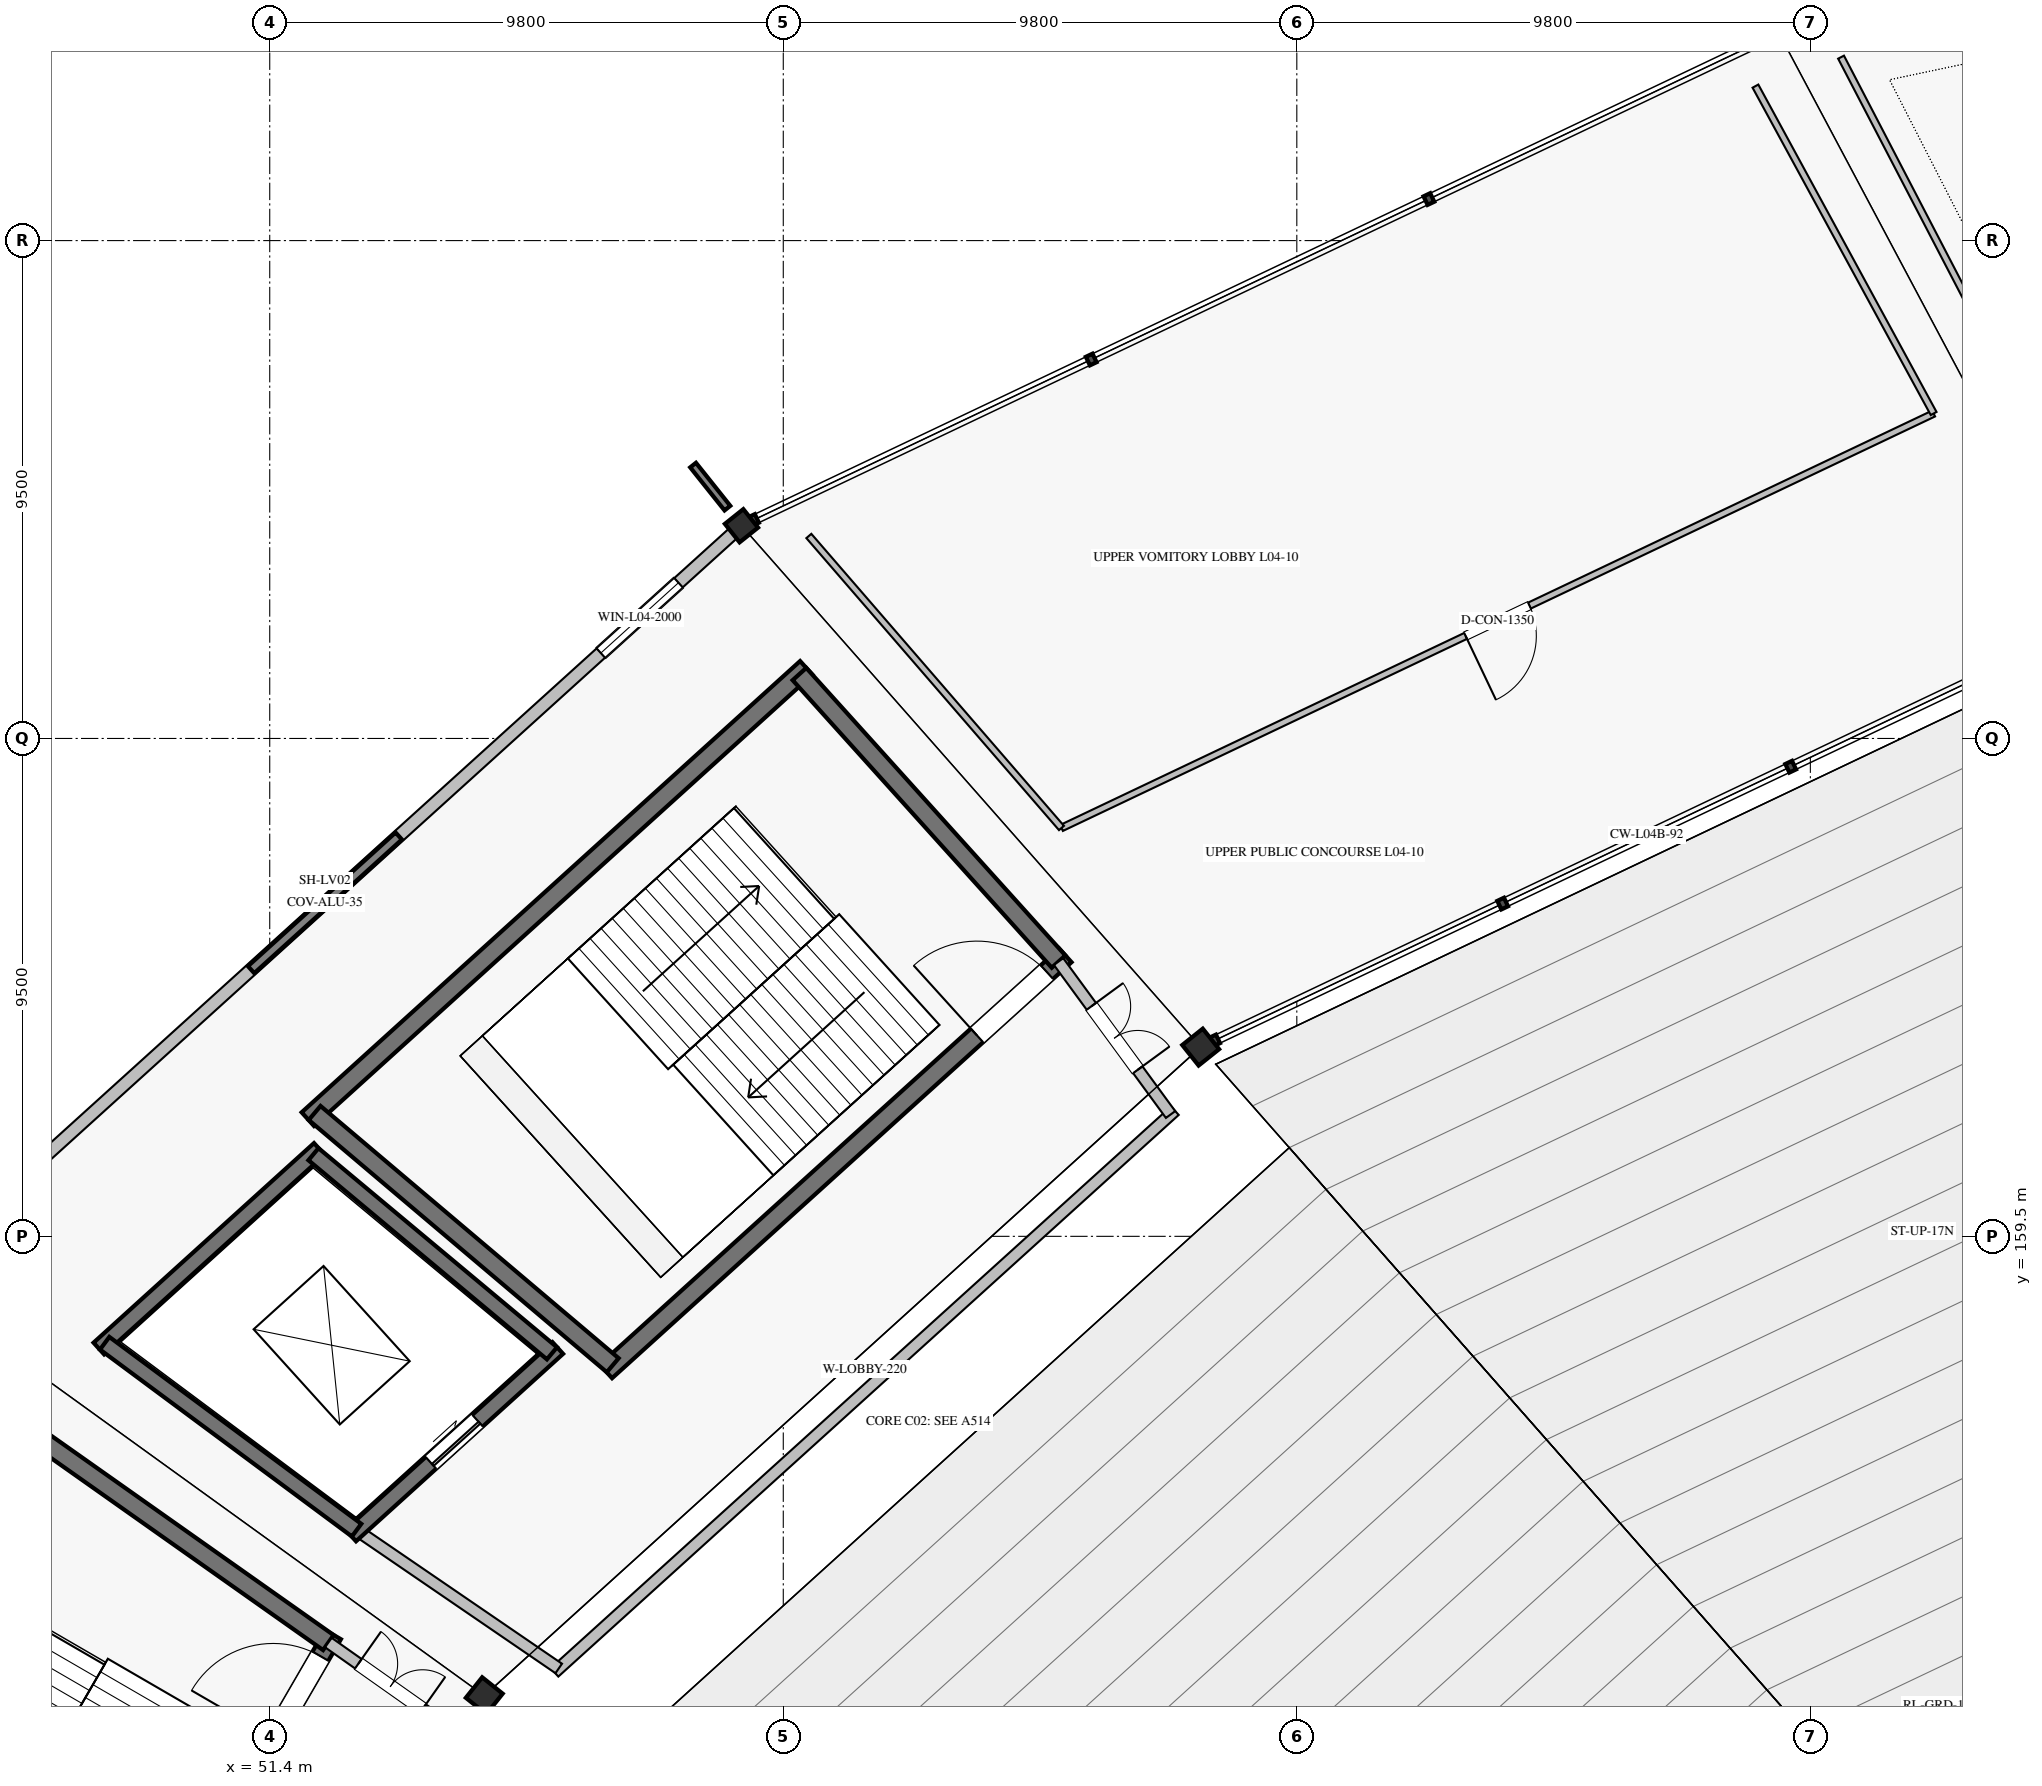
"""IFC4 building model, lengths in metres.
Left out: names, types, materials, properties, quantities, classifications, styles, units other than length and angle.
Written with IfcOpenShell. Run it as: python <this file> out.ifc"""

import sys

from ifc_helpers import new_model, si_unit, direction, frame, frame_2d, origin, origin_2d, place, context, subcontext, project, spatial, rectangle, hollow_rectangle, extrude, element, fill, save


model = new_model("IFC4")
c1 = context("Model", 3, precision=1e-05, world=origin(), true_north=direction((0.0, 1.0)))
c2 = subcontext(c1, "Body", "Model", "MODEL_VIEW")
j1 = project(units=[si_unit("LENGTHUNIT", "METRE"), si_unit("PLANEANGLEUNIT", "RADIAN")], contexts=[c1])
p1 = place(None, origin())
s1 = spatial("IfcSite", under=j1, at=p1, CompositionType="ELEMENT")
p2 = place(p1, origin())
s2 = spatial("IfcBuilding", under=s1, at=p2, CompositionType="ELEMENT")
p3 = place(p2, frame((0.0, 0.0, 20.4)))
s3 = spatial("IfcBuildingStorey", under=s2, at=p3, CompositionType="ELEMENT", Elevation=20.4)
for number, where, z_axis, x_axis in (
    (1, (69.166, 163.111, 0.0), (0.0, 0.0, 1.0), (-0.623, 0.782, 0.0)),
    (2, (55.494, 150.734, 0.0), (0.0, 0.0, 1.0), (-0.782, 0.623, 0.0)),
):
    element("IfcColumn", number, at=place(p3, frame(where, z_axis=z_axis, x_axis=x_axis)), inside=s3, PredefinedType="COLUMN", context=c2, shape_type="SweptSolid", body=[
        extrude(hollow_rectangle(XDim=0.5, YDim=0.5, WallThickness=0.022, at=origin_2d()), origin(), (0.0, 0.0, 1.0), 5.44),
    ])
p4 = place(p3, frame((60.402, 173.059, 0.0), z_axis=(0.0, 0.0, 1.0), x_axis=(-0.623489801853, 0.781831482473, 0.0)))
e3 = element("IfcColumn", 3, at=p4, inside=s3, PredefinedType="COLUMN", context=c2, shape_type="SweptSolid", body=[
    extrude(hollow_rectangle(XDim=0.45, YDim=0.45, WallThickness=0.022, at=origin_2d()), origin(), (0.0, 0.0, 1.0), 5.44),
])
p5 = place(p3, frame((60.239, 172.911, 0.0), z_axis=(0.0, 0.0, 1.0), x_axis=(-0.741349049196, -0.671119651967, 0.0)))
e4 = element("IfcWall", 4, at=p5, inside=s3, PredefinedType="SOLIDWALL", context=c2, shape_type="SweptSolid", body=[
    extrude(rectangle(XDim=21.004, YDim=0.24, at=frame_2d((10.502, 0.0))), origin(), (0.0, 0.0, 1.0), 4.53),
])
p6 = place(p5, frame((1.4, 0.0, 1.0)))
e5 = element("IfcOpeningElement", 5, at=p6, cuts=e4, PredefinedType="OPENING", context=c2, shape_type="SweptSolid", body=[
    extrude(rectangle(XDim=2.0, YDim=1.55, at=frame_2d((1.0, 0.775))), frame((0.0, 0.13, 0.0), z_axis=(0.0, -1.0, 0.0), x_axis=(1.0, 0.0, 0.0)), (0.0, 0.0, 1.0), 0.26),
])
p7 = place(p3, frame((66.583, 164.86, 0.0), z_axis=(0.0, 0.0, 1.0), x_axis=(-0.741348929385, -0.671119784315, 0.0)))
e6 = element("IfcWall", 6, at=p7, inside=s3, PredefinedType="SHEAR", context=c2, shape_type="SweptSolid", body=[
    extrude(rectangle(XDim=11.826, YDim=0.35, at=frame_2d((5.913, 0.0))), origin(), (0.0, 0.0, 1.0), 5.18),
])
p8 = place(p7, frame((0.475, 0.0, 0.0)))
e7 = element("IfcOpeningElement", 7, at=p8, cuts=e6, PredefinedType="OPENING", context=c2, shape_type="SweptSolid", body=[
    extrude(rectangle(XDim=1.8, YDim=2.2, at=frame_2d((0.9, 1.1))), frame((0.0, 0.185, 0.0), z_axis=(0.0, -1.0, 0.0), x_axis=(1.0, 0.0, 0.0)), (0.0, 0.0, 1.0), 0.37),
])
p9 = place(p3, frame((61.639, 170.347, 0.0), z_axis=(0.0, 0.0, 1.0), x_axis=(-0.741351373721, -0.671117084183, 0.0)))
e8 = element("IfcWall", 8, at=p9, inside=s3, PredefinedType="SHEAR", context=c2, shape_type="SweptSolid", body=[
    extrude(rectangle(XDim=12.83, YDim=0.35, at=frame_2d((6.415, 0.0))), origin(), (0.0, 0.0, 1.0), 5.18),
])
p10 = place(p3, frame((66.454, 164.743, 0.0), z_axis=(0.0, 0.0, 1.0), x_axis=(-0.669463145673, 0.742845270958, 0.0)))
e9 = element("IfcWall", 9, at=p10, inside=s3, PredefinedType="SHEAR", context=c2, shape_type="SweptSolid", body=[
    extrude(rectangle(XDim=7.386, YDim=0.35, at=frame_2d((3.693, 0.0))), origin(), (0.0, 0.0, 1.0), 5.18),
])
p11 = place(p3, frame((57.945, 157.041, 0.0), z_axis=(0.0, 0.0, 1.0), x_axis=(-0.763422324031, 0.64589964791, 0.0)))
e10 = element("IfcWall", 10, at=p11, inside=s3, PredefinedType="SHEAR", context=c2, shape_type="SweptSolid", body=[
    extrude(rectangle(XDim=7.452, YDim=0.35, at=frame_2d((3.726, 0.0))), origin(), (0.0, 0.0, 1.0), 5.18),
])
p12 = place(p3, frame((56.897, 157.369, 0.0), z_axis=(0.0, 0.0, 1.0), x_axis=(-0.741350155641, -0.671118429736, 0.0)))
e11 = element("IfcWall", 11, at=p12, inside=s3, PredefinedType="SHEAR", context=c2, shape_type="SweptSolid", body=[
    extrude(rectangle(XDim=5.329, YDim=0.3, at=frame_2d((2.665, 0.0))), origin(), (0.0, 0.0, 1.0), 5.18),
])
p13 = place(p12, frame((2.065, 0.0, 0.0)))
e12 = element("IfcOpeningElement", 12, at=p13, cuts=e11, PredefinedType="OPENING", context=c2, shape_type="SweptSolid", body=[
    extrude(rectangle(XDim=1.2, YDim=2.2, at=frame_2d((0.6, 1.1))), frame((0.0, 0.16, 0.0), z_axis=(0.0, -1.0, 0.0), x_axis=(1.0, 0.0, 0.0)), (0.0, 0.0, 1.0), 0.32),
])
p14 = place(p3, frame((52.346, 161.168, 0.0), z_axis=(0.0, 0.0, 1.0), x_axis=(-0.74134208775, -0.671127341815, 0.0)))
e13 = element("IfcWall", 13, at=p14, inside=s3, PredefinedType="SHEAR", context=c2, shape_type="SweptSolid", body=[
    extrude(rectangle(XDim=5.675, YDim=0.3, at=frame_2d((2.837, 0.0))), origin(), (0.0, 0.0, 1.0), 5.18),
])
p15 = place(p3, frame((56.786, 157.268, 0.0), z_axis=(0.0, 0.0, 1.0), x_axis=(-0.767711354146, 0.640795815151, 0.0)))
e14 = element("IfcWall", 14, at=p15, inside=s3, PredefinedType="SHEAR", context=c2, shape_type="SweptSolid", body=[
    extrude(rectangle(XDim=5.929, YDim=0.3, at=frame_2d((2.964, 0.0))), origin(), (0.0, 0.0, 1.0), 5.18),
])
p16 = place(p3, frame((53.058, 153.893, 0.0), z_axis=(0.0, 0.0, 1.0), x_axis=(-0.803101805449, 0.59584183311, 0.0)))
e15 = element("IfcWall", 15, at=p16, inside=s3, PredefinedType="SHEAR", context=c2, shape_type="SweptSolid", body=[
    extrude(rectangle(XDim=5.986, YDim=0.3, at=frame_2d((2.993, 0.0))), origin(), (0.0, 0.0, 1.0), 5.18),
])
p17 = place(p3, frame((68.673, 161.898, 0.0), z_axis=(0.0, 0.0, 1.0), x_axis=(-0.741351035574, -0.671117457717, 0.0)))
e16 = element("IfcWall", 16, at=p17, inside=s3, PredefinedType="SOLIDWALL", context=c2, shape_type="SweptSolid", body=[
    extrude(rectangle(XDim=15.969, YDim=0.22, at=frame_2d((7.985, 0.0))), origin(), (0.0, 0.0, 1.0), 5.18),
])
p18 = place(p3, frame((68.591, 161.824, 0.0), z_axis=(0.0, 0.0, 1.0), x_axis=(-0.590836915359, 0.806791013491, 0.0)))
e17 = element("IfcWall", 17, at=p18, inside=s3, PredefinedType="SOLIDWALL", context=c2, shape_type="SweptSolid", body=[
    extrude(rectangle(XDim=3.618, YDim=0.22, at=frame_2d((1.809, 0.0))), origin(), (0.0, 0.0, 1.0), 5.18),
])
p19 = place(p18, frame((1.059, 0.0, 0.0)))
e18 = element("IfcOpeningElement", 18, at=p19, cuts=e17, PredefinedType="OPENING", context=c2, shape_type="SweptSolid", body=[
    extrude(rectangle(XDim=1.5, YDim=2.2, at=frame_2d((0.75, 1.1))), frame((0.0, 0.12, 0.0), z_axis=(0.0, -1.0, 0.0), x_axis=(1.0, 0.0, 0.0)), (0.0, 0.0, 1.0), 0.24),
])
p20 = place(p3, frame((56.915, 151.254, 0.0), z_axis=(0.0, 0.0, 1.0), x_axis=(-0.825385410642, 0.564569680287, 0.0)))
e19 = element("IfcWall", 19, at=p20, inside=s3, PredefinedType="SOLIDWALL", context=c2, shape_type="SweptSolid", body=[
    extrude(rectangle(XDim=4.674, YDim=0.22, at=frame_2d((2.337, 0.0))), origin(), (0.0, 0.0, 1.0), 5.18),
])
p21 = place(p3, frame((52.606, 151.9, 0.0), z_axis=(0.0, 0.0, 1.0), x_axis=(-0.501587404838, -0.865106973332, 0.0)))
e20 = element("IfcWall", 20, at=p21, inside=s3, PredefinedType="SHEAR", context=c2, shape_type="SweptSolid", body=[
    extrude(rectangle(XDim=11.435, YDim=0.35, at=frame_2d((5.718, 0.0))), origin(), (0.0, 0.0, 1.0), 5.18),
])
p22 = place(p21, frame((0.475, 0.0, 0.0)))
e21 = element("IfcOpeningElement", 21, at=p22, cuts=e20, PredefinedType="OPENING", context=c2, shape_type="SweptSolid", body=[
    extrude(rectangle(XDim=1.8, YDim=2.2, at=frame_2d((0.9, 1.1))), frame((0.0, 0.185, 0.0), z_axis=(0.0, -1.0, 0.0), x_axis=(1.0, 0.0, 0.0)), (0.0, 0.0, 1.0), 0.37),
])
p23 = place(p3, frame((52.519, 151.748, 0.0), z_axis=(0.0, 0.0, 1.0), x_axis=(-0.816983109824, 0.576661597701, 0.0)))
e22 = element("IfcWall", 22, at=p23, inside=s3, PredefinedType="SHEAR", context=c2, shape_type="SweptSolid", body=[
    extrude(rectangle(XDim=7.544, YDim=0.35, at=frame_2d((3.772, 0.0))), origin(), (0.0, 0.0, 1.0), 5.18),
])
p24 = place(p3, frame((54.889, 150.075, 0.0), z_axis=(0.0, 0.0, 1.0), x_axis=(-0.816984187086, 0.57666007149, 0.0)))
e23 = element("IfcWall", 23, at=p24, inside=s3, PredefinedType="SOLIDWALL", context=c2, shape_type="SweptSolid", body=[
    extrude(rectangle(XDim=2.901, YDim=0.22, at=frame_2d((1.451, 0.0))), origin(), (0.0, 0.0, 1.0), 5.18),
])
p25 = place(p24, frame((0.701, 0.0, 0.0)))
e24 = element("IfcOpeningElement", 24, at=p25, cuts=e23, PredefinedType="OPENING", context=c2, shape_type="SweptSolid", body=[
    extrude(rectangle(XDim=1.5, YDim=2.2, at=frame_2d((0.75, 1.1))), frame((0.0, 0.12, 0.0), z_axis=(0.0, -1.0, 0.0), x_axis=(1.0, 0.0, 0.0)), (0.0, 0.0, 1.0), 0.24),
])
p26 = place(p3, frame((84.658, 175.71, 0.0), z_axis=(0.0, 0.0, 1.0), x_axis=(-0.461466568794, 0.887157599238, 0.0)))
e25 = element("IfcWall", 25, at=p26, inside=s3, PredefinedType="PARTITIONING", context=c2, shape_type="SweptSolid", body=[
    extrude(rectangle(XDim=7.09, YDim=0.125, at=frame_2d((3.545, 0.0))), origin(), (0.0, 0.0, 1.0), 4.5),
])
p27 = place(p3, frame((83.153, 175.2, 0.0), z_axis=(0.0, 0.0, 1.0), x_axis=(-0.90321677741, -0.429184637429, 0.0)))
e26 = element("IfcWall", 26, at=p27, inside=s3, PredefinedType="PARTITIONING", context=c2, shape_type="SweptSolid", body=[
    extrude(rectangle(XDim=18.427, YDim=0.125, at=frame_2d((9.214, 0.0))), origin(), (0.0, 0.0, 1.0), 4.5),
])
p28 = place(p27, frame((8.539, 0.0, 0.0)))
e27 = element("IfcOpeningElement", 27, at=p28, cuts=e26, PredefinedType="OPENING", context=c2, shape_type="SweptSolid", body=[
    extrude(rectangle(XDim=1.35, YDim=2.15, at=frame_2d((0.675, 1.075))), frame((0.0, 0.073, 0.0), z_axis=(0.0, -1.0, 0.0), x_axis=(1.0, 0.0, 0.0)), (0.0, 0.0, 1.0), 0.145),
])
p29 = place(p3, frame((83.153, 175.2, 0.0), z_axis=(0.0, 0.0, 1.0), x_axis=(-0.47812325427, 0.878292749444, 0.0)))
e28 = element("IfcWall", 28, at=p29, inside=s3, PredefinedType="PARTITIONING", context=c2, shape_type="SweptSolid", body=[
    extrude(rectangle(XDim=7.113, YDim=0.125, at=frame_2d((3.556, 0.0))), origin(), (0.0, 0.0, 1.0), 4.5),
])
p30 = place(p3, frame((66.509, 167.292, 0.0), z_axis=(0.0, 0.0, 1.0), x_axis=(-0.654288201841, 0.7562452968, 0.0)))
e29 = element("IfcWall", 29, at=p30, inside=s3, PredefinedType="PARTITIONING", context=c2, shape_type="SweptSolid", body=[
    extrude(rectangle(XDim=7.368, YDim=0.125, at=frame_2d((3.684, 0.0))), origin(), (0.0, 0.0, 1.0), 4.5),
])
p31 = place(p6, origin())
e30 = element("IfcWindow", 30, at=p31, inside=s3, PartitioningType="SINGLE_PANEL", PredefinedType="WINDOW", context=c2, shape_type="SweptSolid", body=[
    extrude(rectangle(XDim=2.0, YDim=1.55, at=frame_2d((1.0, 0.775))), frame((0.0, 0.03, 0.0), z_axis=(0.0, -1.0, 0.0), x_axis=(1.0, 0.0, 0.0)), (0.0, 0.0, 1.0), 0.06),
])
fill(e5, e30)
p32 = place(p8, frame((1.8, 0.0, 0.0), z_axis=(0.0, 0.0, 1.0), x_axis=(-1.0, 0.0, 0.0)))
e31 = element("IfcDoor", 31, at=p32, inside=s3, OperationType="SINGLE_SWING_LEFT", PredefinedType="DOOR", context=c2, shape_type="SweptSolid", body=[
    extrude(rectangle(XDim=1.8, YDim=2.2, at=frame_2d((0.9, 1.1))), frame((0.0, 0.025, 0.0), z_axis=(0.0, -1.0, 0.0), x_axis=(1.0, 0.0, 0.0)), (0.0, 0.0, 1.0), 0.05),
])
fill(e7, e31)
p33 = place(p13, origin())
e32 = element("IfcDoor", 32, at=p33, inside=s3, OperationType="SLIDING_TO_LEFT", PredefinedType="DOOR", context=c2, shape_type="SweptSolid", body=[
    extrude(rectangle(XDim=1.2, YDim=2.2, at=frame_2d((0.6, 1.1))), frame((0.0, 0.025, 0.0), z_axis=(0.0, -1.0, 0.0), x_axis=(1.0, 0.0, 0.0)), (0.0, 0.0, 1.0), 0.05),
])
fill(e12, e32)
p34 = place(p19, frame((1.5, 0.0, 0.0), z_axis=(0.0, 0.0, 1.0), x_axis=(-1.0, 0.0, 0.0)))
e33 = element("IfcDoor", 33, at=p34, inside=s3, OperationType="DOUBLE_DOOR_SINGLE_SWING", PredefinedType="DOOR", context=c2, shape_type="SweptSolid", body=[
    extrude(rectangle(XDim=1.5, YDim=2.2, at=frame_2d((0.75, 1.1))), frame((0.0, 0.025, 0.0), z_axis=(0.0, -1.0, 0.0), x_axis=(1.0, 0.0, 0.0)), (0.0, 0.0, 1.0), 0.05),
])
fill(e18, e33)
p35 = place(p22, frame((1.8, 0.0, 0.0), z_axis=(0.0, 0.0, 1.0), x_axis=(-1.0, 0.0, 0.0)))
e34 = element("IfcDoor", 34, at=p35, inside=s3, OperationType="SINGLE_SWING_LEFT", PredefinedType="DOOR", context=c2, shape_type="SweptSolid", body=[
    extrude(rectangle(XDim=1.8, YDim=2.2, at=frame_2d((0.9, 1.1))), frame((0.0, 0.025, 0.0), z_axis=(0.0, -1.0, 0.0), x_axis=(1.0, 0.0, 0.0)), (0.0, 0.0, 1.0), 0.05),
])
fill(e21, e34)
p36 = place(p25, frame((1.5, 0.0, 0.0), z_axis=(0.0, 0.0, 1.0), x_axis=(-1.0, 0.0, 0.0)))
e35 = element("IfcDoor", 35, at=p36, inside=s3, OperationType="DOUBLE_DOOR_SINGLE_SWING", PredefinedType="DOOR", context=c2, shape_type="SweptSolid", body=[
    extrude(rectangle(XDim=1.5, YDim=2.2, at=frame_2d((0.75, 1.1))), frame((0.0, 0.025, 0.0), z_axis=(0.0, -1.0, 0.0), x_axis=(1.0, 0.0, 0.0)), (0.0, 0.0, 1.0), 0.05),
])
fill(e24, e35)
p37 = place(p28, origin())
e36 = element("IfcDoor", 36, at=p37, inside=s3, OperationType="SINGLE_SWING_RIGHT", PredefinedType="DOOR", context=c2, shape_type="SweptSolid", body=[
    extrude(rectangle(XDim=1.35, YDim=2.15, at=frame_2d((0.675, 1.075))), frame((0.0, 0.025, 0.0), z_axis=(0.0, -1.0, 0.0), x_axis=(1.0, 0.0, 0.0)), (0.0, 0.0, 1.0), 0.05),
])
fill(e27, e36)
save(model, sys.argv[1])
